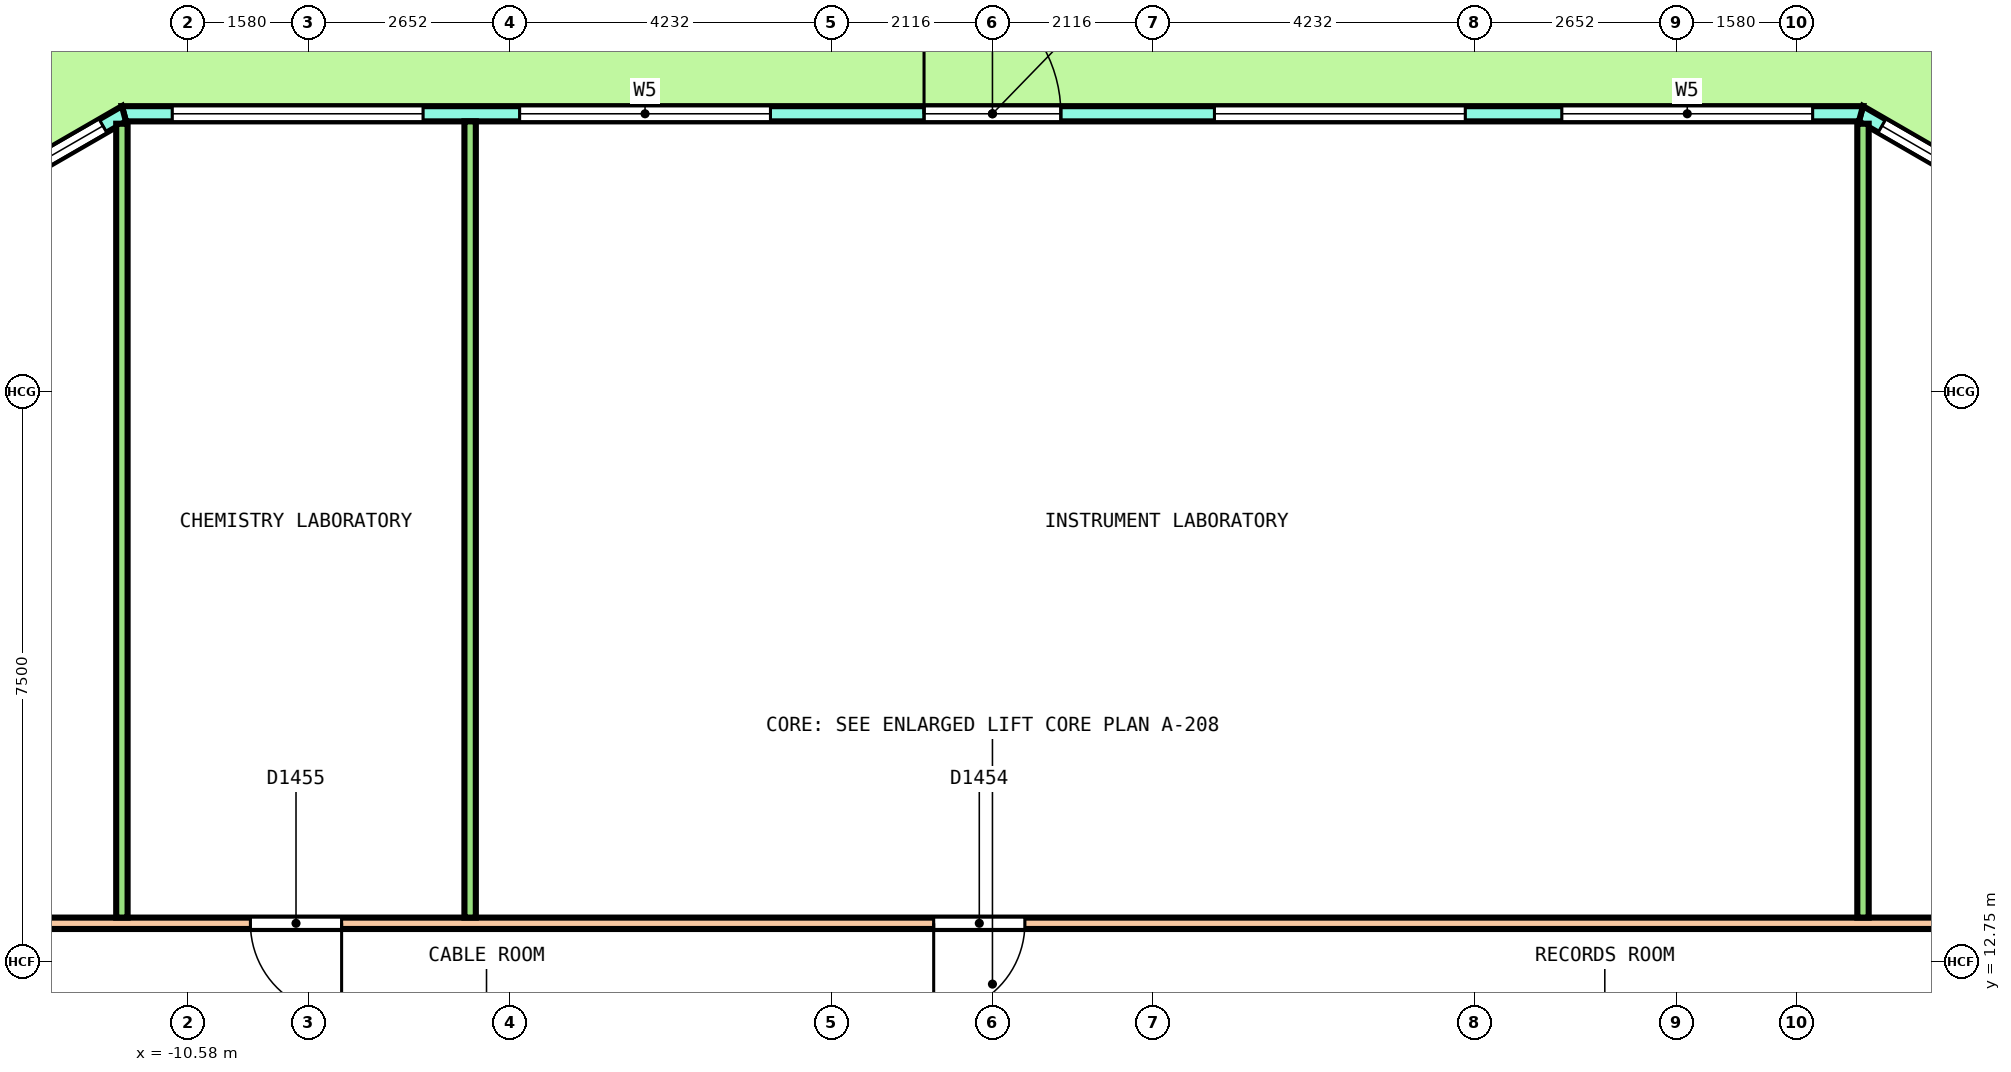
"""IFC4 building model, lengths in metres.
Left out: names, types, materials, properties, quantities, classifications, styles, units other than length and angle.
Written with IfcOpenShell. Run it as: python <this file> out.ifc"""

import sys

from ifc_helpers import new_model, si_unit, direction, frame, frame_2d, origin, place, context, subcontext, project, spatial, polyline, rectangle, outline, extrude, element, fill, save


model = new_model("IFC4")
c1 = context("Model", 3, precision=1e-05, world=origin(), true_north=direction((0.0, 1.0)))
c2 = subcontext(c1, "Body", "Model", "MODEL_VIEW")
j1 = project(units=[si_unit("LENGTHUNIT", "METRE"), si_unit("PLANEANGLEUNIT", "RADIAN")], contexts=[c1])
p1 = place(None, origin())
s1 = spatial("IfcSite", under=j1, at=p1, CompositionType="ELEMENT")
p2 = place(p1, origin())
s2 = spatial("IfcBuilding", under=s1, at=p2, CompositionType="ELEMENT")
p3 = place(p2, frame((0.0, 0.0, 63.0)))
s3 = spatial("IfcBuildingStorey", under=s2, at=p3, CompositionType="ELEMENT", Elevation=63.0)
p4 = place(p3, frame((17.38, 20.463, 0.0), z_axis=(0.0, 0.0, 1.0), x_axis=(-0.866029458321, 0.49999297727, 0.0)))
e1 = element("IfcWall", 1, at=p4, inside=s3, PredefinedType="SOLIDWALL", context=c2, shape_type="SweptSolid", body=[
    extrude(outline(polyline([(-0.027, -0.1), (1.128, -0.1), (2.282, -0.1), (3.437, -0.1), (4.592, -0.1), (5.747, -0.1), (6.901, -0.1), (6.848, 0.1), (5.711, 0.1), (4.574, 0.1), (3.437, 0.1), (2.301, 0.1), (1.164, 0.1), (0.027, 0.1), (-0.027, -0.1)])), origin(), (0.0, 0.0, 1.0), 4.1),
])
p5 = place(p4, frame((0.319, 0.0, 0.1)))
e2 = element("IfcOpeningElement", 2, at=p5, cuts=e1, PredefinedType="OPENING", context=c2, shape_type="SweptSolid", body=[
    extrude(rectangle(XDim=2.8, YDim=2.9, at=frame_2d((1.4, 1.45))), frame((0.0, 0.11, 0.0), z_axis=(0.0, -1.0, 0.0), x_axis=(1.0, 0.0, 0.0)), (0.0, 0.0, 1.0), 0.22),
])
p6 = place(p4, frame((3.756, 0.0, 0.1)))
e3 = element("IfcOpeningElement", 3, at=p6, cuts=e1, PredefinedType="OPENING", context=c2, shape_type="SweptSolid", body=[
    extrude(rectangle(XDim=2.8, YDim=2.9, at=frame_2d((1.4, 1.45))), frame((0.0, 0.11, 0.0), z_axis=(0.0, -1.0, 0.0), x_axis=(1.0, 0.0, 0.0)), (0.0, 0.0, 1.0), 0.22),
])
p7 = place(p3, frame((11.426, 23.9, 0.0), z_axis=(0.0, 0.0, 1.0), x_axis=(-1.0, 0.0, 0.0)))
e4 = element("IfcWall", 4, at=p7, inside=s3, PredefinedType="SOLIDWALL", context=c2, shape_type="SweptSolid", body=[
    extrude(outline(polyline([(-0.027, -0.1), (1.014, -0.1), (2.055, -0.1), (3.097, -0.1), (4.138, -0.1), (5.179, -0.1), (6.22, -0.1), (7.261, -0.1), (8.303, -0.1), (9.344, -0.1), (10.385, -0.1), (11.426, -0.1), (12.468, -0.1), (13.509, -0.1), (14.55, -0.1), (15.591, -0.1), (16.632, -0.1), (17.673, -0.1), (18.715, -0.1), (19.756, -0.1), (20.797, -0.1), (21.838, -0.1), (22.879, -0.1), (22.826, 0.1), (21.789, 0.1), (20.753, 0.1), (19.717, 0.1), (18.68, 0.1), (17.644, 0.1), (16.608, 0.1), (15.572, 0.1), (14.535, 0.1), (13.499, 0.1), (12.463, 0.1), (11.426, 0.1), (10.39, 0.1), (9.354, 0.1), (8.317, 0.1), (7.281, 0.1), (6.245, 0.1), (5.208, 0.1), (4.172, 0.1), (3.136, 0.1), (2.099, 0.1), (1.063, 0.1), (0.027, 0.1), (-0.027, -0.1)])), origin(), (0.0, 0.0, 1.0), 4.1),
])
p8 = place(p7, frame((0.635, 0.0, 0.1)))
e5 = element("IfcOpeningElement", 5, at=p8, cuts=e4, PredefinedType="OPENING", context=c2, shape_type="SweptSolid", body=[
    extrude(rectangle(XDim=3.3, YDim=2.9, at=frame_2d((1.65, 1.45))), frame((0.0, 0.11, 0.0), z_axis=(0.0, -1.0, 0.0), x_axis=(1.0, 0.0, 0.0)), (0.0, 0.0, 1.0), 0.22),
])
p9 = place(p7, frame((5.206, 0.0, 0.1)))
e6 = element("IfcOpeningElement", 6, at=p9, cuts=e4, PredefinedType="OPENING", context=c2, shape_type="SweptSolid", body=[
    extrude(rectangle(XDim=3.3, YDim=2.9, at=frame_2d((1.65, 1.45))), frame((0.0, 0.11, 0.0), z_axis=(0.0, -1.0, 0.0), x_axis=(1.0, 0.0, 0.0)), (0.0, 0.0, 1.0), 0.22),
])
p10 = place(p7, frame((10.526, 0.0, 0.0)))
e7 = element("IfcOpeningElement", 7, at=p10, cuts=e4, PredefinedType="OPENING", context=c2, shape_type="SweptSolid", body=[
    extrude(rectangle(XDim=1.8, YDim=2.4, at=frame_2d((0.9, 1.2))), frame((0.0, 0.11, 0.0), z_axis=(0.0, -1.0, 0.0), x_axis=(1.0, 0.0, 0.0)), (0.0, 0.0, 1.0), 0.22),
])
p11 = place(p7, frame((10.526, 0.0, 2.55)))
e8 = element("IfcOpeningElement", 8, at=p11, cuts=e4, PredefinedType="OPENING", context=c2, shape_type="SweptSolid", body=[
    extrude(rectangle(XDim=1.8, YDim=0.45, at=frame_2d((0.9, 0.225))), frame((0.0, 0.11, 0.0), z_axis=(0.0, -1.0, 0.0), x_axis=(1.0, 0.0, 0.0)), (0.0, 0.0, 1.0), 0.22),
])
p12 = place(p7, frame((14.347, 0.0, 0.1)))
e9 = element("IfcOpeningElement", 9, at=p12, cuts=e4, PredefinedType="OPENING", context=c2, shape_type="SweptSolid", body=[
    extrude(rectangle(XDim=3.3, YDim=2.9, at=frame_2d((1.65, 1.45))), frame((0.0, 0.11, 0.0), z_axis=(0.0, -1.0, 0.0), x_axis=(1.0, 0.0, 0.0)), (0.0, 0.0, 1.0), 0.22),
])
p13 = place(p7, frame((18.917, 0.0, 0.1)))
e10 = element("IfcOpeningElement", 10, at=p13, cuts=e4, PredefinedType="OPENING", context=c2, shape_type="SweptSolid", body=[
    extrude(rectangle(XDim=3.3, YDim=2.9, at=frame_2d((1.65, 1.45))), frame((0.0, 0.11, 0.0), z_axis=(0.0, -1.0, 0.0), x_axis=(1.0, 0.0, 0.0)), (0.0, 0.0, 1.0), 0.22),
])
p14 = place(p3, frame((-11.426, 23.9, 0.0), z_axis=(0.0, 0.0, 1.0), x_axis=(-0.866029458321, -0.49999297727, 0.0)))
e11 = element("IfcWall", 11, at=p14, inside=s3, PredefinedType="SOLIDWALL", context=c2, shape_type="SweptSolid", body=[
    extrude(outline(polyline([(-0.027, -0.1), (1.128, -0.1), (2.282, -0.1), (3.437, -0.1), (4.592, -0.1), (5.747, -0.1), (6.901, -0.1), (6.848, 0.1), (5.711, 0.1), (4.574, 0.1), (3.437, 0.1), (2.301, 0.1), (1.164, 0.1), (0.027, 0.1), (-0.027, -0.1)])), origin(), (0.0, 0.0, 1.0), 4.1),
])
p15 = place(p14, frame((0.319, 0.0, 0.1)))
e12 = element("IfcOpeningElement", 12, at=p15, cuts=e11, PredefinedType="OPENING", context=c2, shape_type="SweptSolid", body=[
    extrude(rectangle(XDim=2.8, YDim=2.9, at=frame_2d((1.4, 1.45))), frame((0.0, 0.11, 0.0), z_axis=(0.0, -1.0, 0.0), x_axis=(1.0, 0.0, 0.0)), (0.0, 0.0, 1.0), 0.22),
])
p16 = place(p14, frame((3.756, 0.0, 0.1)))
e13 = element("IfcOpeningElement", 13, at=p16, cuts=e11, PredefinedType="OPENING", context=c2, shape_type="SweptSolid", body=[
    extrude(rectangle(XDim=2.8, YDim=2.9, at=frame_2d((1.4, 1.45))), frame((0.0, 0.11, 0.0), z_axis=(0.0, -1.0, 0.0), x_axis=(1.0, 0.0, 0.0)), (0.0, 0.0, 1.0), 0.22),
])
p17 = place(p3, frame((-15.575, 13.25, 0.0), z_axis=(0.0, 0.0, 1.0), x_axis=(1.0, 0.0, 0.0)))
e14 = element("IfcWall", 14, at=p17, inside=s3, PredefinedType="PARTITIONING", context=c2, shape_type="SweptSolid", body=[
    extrude(rectangle(XDim=31.175, YDim=0.15, at=frame_2d((15.587, 0.0))), origin(), (0.0, 0.0, 1.0), 3.05),
])
p18 = place(p17, frame((28.252, 0.0, 0.0)))
e15 = element("IfcOpeningElement", 15, at=p18, cuts=e14, PredefinedType="OPENING", context=c2, shape_type="SweptSolid", body=[
    extrude(rectangle(XDim=1.0, YDim=2.1, at=frame_2d((0.5, 1.05))), frame((0.0, 0.085, 0.0), z_axis=(0.0, -1.0, 0.0), x_axis=(1.0, 0.0, 0.0)), (0.0, 0.0, 1.0), 0.17),
])
p19 = place(p17, frame((14.802, 0.0, 0.0)))
e16 = element("IfcOpeningElement", 16, at=p19, cuts=e14, PredefinedType="OPENING", context=c2, shape_type="SweptSolid", body=[
    extrude(rectangle(XDim=1.2, YDim=2.1, at=frame_2d((0.6, 1.05))), frame((0.0, 0.085, 0.0), z_axis=(0.0, -1.0, 0.0), x_axis=(1.0, 0.0, 0.0)), (0.0, 0.0, 1.0), 0.17),
])
p20 = place(p17, frame((5.812, 0.0, 0.0)))
e17 = element("IfcOpeningElement", 17, at=p20, cuts=e14, PredefinedType="OPENING", context=c2, shape_type="SweptSolid", body=[
    extrude(rectangle(XDim=1.2, YDim=2.1, at=frame_2d((0.6, 1.05))), frame((0.0, 0.085, 0.0), z_axis=(0.0, -1.0, 0.0), x_axis=(1.0, 0.0, 0.0)), (0.0, 0.0, 1.0), 0.17),
])
p21 = place(p17, frame((0.849, 0.0, 0.0)))
e18 = element("IfcOpeningElement", 18, at=p21, cuts=e14, PredefinedType="OPENING", context=c2, shape_type="SweptSolid", body=[
    extrude(rectangle(XDim=1.2, YDim=2.1, at=frame_2d((0.6, 1.05))), frame((0.0, 0.085, 0.0), z_axis=(0.0, -1.0, 0.0), x_axis=(1.0, 0.0, 0.0)), (0.0, 0.0, 1.0), 0.17),
])
p22 = place(p3, frame((11.453, 13.325, 0.0), z_axis=(0.0, 0.0, 1.0), x_axis=(0.0, 1.0, 0.0)))
e19 = element("IfcWall", 19, at=p22, inside=s3, PredefinedType="PARTITIONING", context=c2, shape_type="SweptSolid", body=[
    extrude(rectangle(XDim=10.444, YDim=0.15, at=frame_2d((5.222, 0.0))), origin(), (0.0, 0.0, 1.0), 3.05),
])
p23 = place(p3, frame((-6.872, 13.325, 0.0), z_axis=(0.0, 0.0, 1.0), x_axis=(0.0, 1.0, 0.0)))
e20 = element("IfcWall", 20, at=p23, inside=s3, PredefinedType="PARTITIONING", context=c2, shape_type="SweptSolid", body=[
    extrude(rectangle(XDim=10.475, YDim=0.15, at=frame_2d((5.238, 0.0))), origin(), (0.0, 0.0, 1.0), 3.05),
])
p24 = place(p3, frame((-11.453, 13.325, 0.0), z_axis=(0.0, 0.0, 1.0), x_axis=(0.0, 1.0, 0.0)))
e21 = element("IfcWall", 21, at=p24, inside=s3, PredefinedType="PARTITIONING", context=c2, shape_type="SweptSolid", body=[
    extrude(rectangle(XDim=10.444, YDim=0.15, at=frame_2d((5.222, 0.0))), origin(), (0.0, 0.0, 1.0), 3.05),
])
p25 = place(p6, origin())
e22 = element("IfcWindow", 22, at=p25, inside=s3, PartitioningType="SINGLE_PANEL", PredefinedType="WINDOW", context=c2, shape_type="SweptSolid", body=[
    extrude(rectangle(XDim=2.8, YDim=2.9, at=frame_2d((1.4, 1.45))), frame((0.0, 0.03, 0.0), z_axis=(0.0, -1.0, 0.0), x_axis=(1.0, 0.0, 0.0)), (0.0, 0.0, 1.0), 0.06),
])
fill(e3, e22)
p26 = place(p8, origin())
e23 = element("IfcWindow", 23, at=p26, inside=s3, PartitioningType="SINGLE_PANEL", PredefinedType="WINDOW", context=c2, shape_type="SweptSolid", body=[
    extrude(rectangle(XDim=3.3, YDim=2.9, at=frame_2d((1.65, 1.45))), frame((0.0, 0.03, 0.0), z_axis=(0.0, -1.0, 0.0), x_axis=(1.0, 0.0, 0.0)), (0.0, 0.0, 1.0), 0.06),
])
fill(e5, e23)
p27 = place(p9, origin())
e24 = element("IfcWindow", 24, at=p27, inside=s3, PartitioningType="SINGLE_PANEL", PredefinedType="WINDOW", context=c2, shape_type="SweptSolid", body=[
    extrude(rectangle(XDim=3.3, YDim=2.9, at=frame_2d((1.65, 1.45))), frame((0.0, 0.03, 0.0), z_axis=(0.0, -1.0, 0.0), x_axis=(1.0, 0.0, 0.0)), (0.0, 0.0, 1.0), 0.06),
])
fill(e6, e24)
p28 = place(p10, origin())
e25 = element("IfcDoor", 25, at=p28, inside=s3, OperationType="DOUBLE_DOOR_SINGLE_SWING", PredefinedType="DOOR", context=c2, shape_type="SweptSolid", body=[
    extrude(rectangle(XDim=1.8, YDim=2.4, at=frame_2d((0.9, 1.2))), frame((0.0, 0.025, 0.0), z_axis=(0.0, -1.0, 0.0), x_axis=(1.0, 0.0, 0.0)), (0.0, 0.0, 1.0), 0.05),
])
fill(e7, e25)
p29 = place(p11, origin())
e26 = element("IfcWindow", 26, at=p29, inside=s3, PartitioningType="SINGLE_PANEL", PredefinedType="WINDOW", context=c2, shape_type="SweptSolid", body=[
    extrude(rectangle(XDim=1.8, YDim=0.45, at=frame_2d((0.9, 0.225))), frame((0.0, 0.03, 0.0), z_axis=(0.0, -1.0, 0.0), x_axis=(1.0, 0.0, 0.0)), (0.0, 0.0, 1.0), 0.06),
])
fill(e8, e26)
p30 = place(p12, origin())
e27 = element("IfcWindow", 27, at=p30, inside=s3, PartitioningType="SINGLE_PANEL", PredefinedType="WINDOW", context=c2, shape_type="SweptSolid", body=[
    extrude(rectangle(XDim=3.3, YDim=2.9, at=frame_2d((1.65, 1.45))), frame((0.0, 0.03, 0.0), z_axis=(0.0, -1.0, 0.0), x_axis=(1.0, 0.0, 0.0)), (0.0, 0.0, 1.0), 0.06),
])
fill(e9, e27)
p31 = place(p13, origin())
e28 = element("IfcWindow", 28, at=p31, inside=s3, PartitioningType="SINGLE_PANEL", PredefinedType="WINDOW", context=c2, shape_type="SweptSolid", body=[
    extrude(rectangle(XDim=3.3, YDim=2.9, at=frame_2d((1.65, 1.45))), frame((0.0, 0.03, 0.0), z_axis=(0.0, -1.0, 0.0), x_axis=(1.0, 0.0, 0.0)), (0.0, 0.0, 1.0), 0.06),
])
fill(e10, e28)
p32 = place(p15, origin())
e29 = element("IfcWindow", 29, at=p32, inside=s3, PartitioningType="SINGLE_PANEL", PredefinedType="WINDOW", context=c2, shape_type="SweptSolid", body=[
    extrude(rectangle(XDim=2.8, YDim=2.9, at=frame_2d((1.4, 1.45))), frame((0.0, 0.03, 0.0), z_axis=(0.0, -1.0, 0.0), x_axis=(1.0, 0.0, 0.0)), (0.0, 0.0, 1.0), 0.06),
])
fill(e12, e29)
p33 = place(p19, origin())
e30 = element("IfcDoor", 30, at=p33, inside=s3, OperationType="DOUBLE_DOOR_SINGLE_SWING", PredefinedType="DOOR", context=c2, shape_type="SweptSolid", body=[
    extrude(rectangle(XDim=1.2, YDim=2.1, at=frame_2d((0.6, 1.05))), frame((0.0, 0.025, 0.0), z_axis=(0.0, -1.0, 0.0), x_axis=(1.0, 0.0, 0.0)), (0.0, 0.0, 1.0), 0.05),
])
fill(e16, e30)
p34 = place(p20, origin())
e31 = element("IfcDoor", 31, at=p34, inside=s3, OperationType="DOUBLE_DOOR_SINGLE_SWING", PredefinedType="DOOR", context=c2, shape_type="SweptSolid", body=[
    extrude(rectangle(XDim=1.2, YDim=2.1, at=frame_2d((0.6, 1.05))), frame((0.0, 0.025, 0.0), z_axis=(0.0, -1.0, 0.0), x_axis=(1.0, 0.0, 0.0)), (0.0, 0.0, 1.0), 0.05),
])
fill(e17, e31)
save(model, sys.argv[1])
